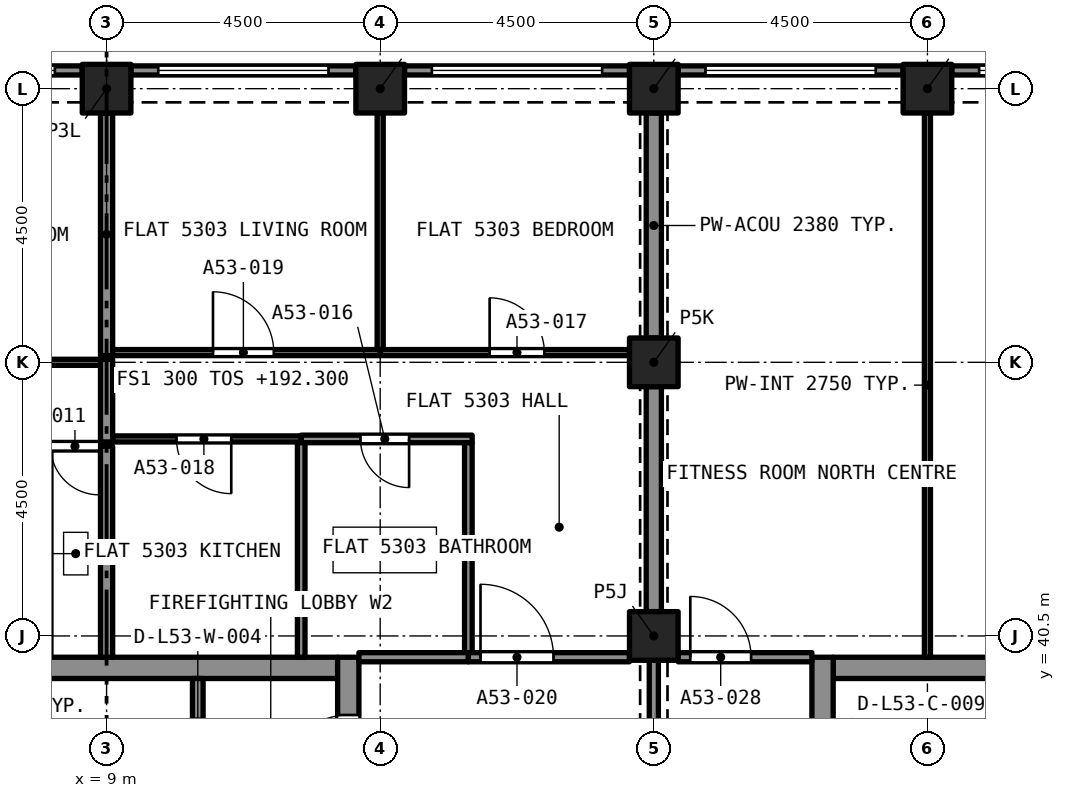
"""IFC4 building model, lengths in metres.
Left out: names, types, materials, properties, quantities, classifications, styles, units other than length and angle.
Written with IfcOpenShell. Run it as: python <this file> out.ifc"""

import sys

from ifc_helpers import new_model, si_unit, direction, frame, frame_2d, origin, origin_2d, place, context, subcontext, project, spatial, rectangle, extrude, element, fill, save


model = new_model("IFC4")
c1 = context("Model", 3, precision=1e-05, world=origin(), true_north=direction((0.0, 1.0)))
c2 = subcontext(c1, "Body", "Model", "MODEL_VIEW")
j1 = project(units=[si_unit("LENGTHUNIT", "METRE"), si_unit("PLANEANGLEUNIT", "RADIAN")], contexts=[c1])
p1 = place(None, origin())
s1 = spatial("IfcSite", under=j1, at=p1, CompositionType="ELEMENT")
p2 = place(p1, origin())
s2 = spatial("IfcBuilding", under=s1, at=p2, CompositionType="ELEMENT")
p3 = place(p2, frame((0.0, 0.0, 192.3)))
s3 = spatial("IfcBuildingStorey", under=s2, at=p3, CompositionType="ELEMENT", Elevation=192.3)
for number, where, z_axis, x_axis in (
    (1, (18.0, 40.5, 0.0), (0.0, 0.0, 1.0), (1.0, 0.0, 0.0)),
    (2, (18.0, 45.0, 0.0), (0.0, 0.0, 1.0), (1.0, 0.0, 0.0)),
    (3, (9.0, 49.5, 0.0), (0.0, 0.0, 1.0), (1.0, 0.0, 0.0)),
    (4, (13.5, 49.5, 0.0), (0.0, 0.0, 1.0), (1.0, 0.0, 0.0)),
    (5, (18.0, 49.5, 0.0), (0.0, 0.0, 1.0), (1.0, 0.0, 0.0)),
    (6, (22.5, 49.5, 0.0), (0.0, 0.0, 1.0), (1.0, 0.0, 0.0)),
):
    element("IfcColumn", number, at=place(p3, frame(where, z_axis=z_axis, x_axis=x_axis)), inside=s3, PredefinedType="COLUMN", context=c2, shape_type="SweptSolid", body=[
        extrude(rectangle(XDim=0.8, YDim=0.8, at=origin_2d()), origin(), (0.0, 0.0, 1.0), 3.2),
    ])
p4 = place(p3, frame((5.2, 39.975, 0.0), z_axis=(0.0, 0.0, 1.0), x_axis=(1.0, 0.0, 0.0)))
e7 = element("IfcWall", 7, at=p4, inside=s3, PredefinedType="SOLIDWALL", context=c2, shape_type="SweptSolid", body=[
    extrude(rectangle(XDim=7.6, YDim=0.35, at=frame_2d((3.8, 0.0))), origin(), (0.0, 0.0, 1.0), 3.2),
])
p5 = place(p3, frame((12.975, 27.35, 0.0), z_axis=(0.0, 0.0, 1.0), x_axis=(0.0, 1.0, 0.0)))
e8 = element("IfcWall", 8, at=p5, inside=s3, PredefinedType="SOLIDWALL", context=c2, shape_type="SweptSolid", body=[
    extrude(rectangle(XDim=12.8, YDim=0.35, at=frame_2d((6.4, 0.0))), origin(), (0.0, 0.0, 1.0), 3.2),
])
p6 = place(p5, frame((10.75, 0.0, 0.0)))
e9 = element("IfcOpeningElement", 9, at=p6, cuts=e8, PredefinedType="OPENING", context=c2, shape_type="SweptSolid", body=[
    extrude(rectangle(XDim=1.1, YDim=2.1, at=frame_2d((0.55, 1.05))), frame((0.0, 0.185, 0.0), z_axis=(0.0, -1.0, 0.0), x_axis=(1.0, 0.0, 0.0)), (0.0, 0.0, 1.0), 0.37),
])
p7 = place(p5, frame((8.6, 0.0, 0.0)))
e10 = element("IfcOpeningElement", 10, at=p7, cuts=e8, PredefinedType="OPENING", context=c2, shape_type="SweptSolid", body=[
    extrude(rectangle(XDim=1.2, YDim=2.1, at=frame_2d((0.6, 1.05))), frame((0.0, 0.185, 0.0), z_axis=(0.0, -1.0, 0.0), x_axis=(1.0, 0.0, 0.0)), (0.0, 0.0, 1.0), 0.37),
])
p8 = place(p3, frame((20.95, 39.975, 0.0), z_axis=(0.0, 0.0, 1.0), x_axis=(1.0, 0.0, 0.0)))
e11 = element("IfcWall", 11, at=p8, inside=s3, PredefinedType="SOLIDWALL", context=c2, shape_type="SweptSolid", body=[
    extrude(rectangle(XDim=7.6, YDim=0.35, at=frame_2d((3.8, 0.0))), origin(), (0.0, 0.0, 1.0), 3.2),
])
p9 = place(p3, frame((20.775, 27.35, 0.0), z_axis=(0.0, 0.0, 1.0), x_axis=(0.0, 1.0, 0.0)))
e12 = element("IfcWall", 12, at=p9, inside=s3, PredefinedType="SOLIDWALL", context=c2, shape_type="SweptSolid", body=[
    extrude(rectangle(XDim=12.8, YDim=0.35, at=frame_2d((6.4, 0.0))), origin(), (0.0, 0.0, 1.0), 3.2),
])
p10 = place(p9, frame((8.6, 0.0, 0.0)))
e13 = element("IfcOpeningElement", 13, at=p10, cuts=e12, PredefinedType="OPENING", context=c2, shape_type="SweptSolid", body=[
    extrude(rectangle(XDim=1.2, YDim=2.1, at=frame_2d((0.6, 1.05))), frame((0.0, 0.185, 0.0), z_axis=(0.0, -1.0, 0.0), x_axis=(1.0, 0.0, 0.0)), (0.0, 0.0, 1.0), 0.37),
])
p11 = place(p3, frame((22.9, 49.8, 0.0), z_axis=(0.0, 0.0, 1.0), x_axis=(1.0, 0.0, 0.0)))
e14 = element("IfcWall", 14, at=p11, inside=s3, PredefinedType="SOLIDWALL", context=c2, shape_type="SweptSolid", body=[
    extrude(rectangle(XDim=3.7, YDim=0.15, at=frame_2d((1.85, 0.0))), origin(), (0.0, 0.0, 1.0), 3.2),
])
p12 = place(p11, frame((0.45, 0.0, 0.45)))
e15 = element("IfcOpeningElement", 15, at=p12, cuts=e14, PredefinedType="OPENING", context=c2, shape_type="SweptSolid", body=[
    extrude(rectangle(XDim=2.8, YDim=1.95, at=frame_2d((1.4, 0.975))), frame((0.0, 0.085, 0.0), z_axis=(0.0, -1.0, 0.0), x_axis=(1.0, 0.0, 0.0)), (0.0, 0.0, 1.0), 0.17),
])
p13 = place(p3, frame((18.4, 49.8, 0.0), z_axis=(0.0, 0.0, 1.0), x_axis=(1.0, 0.0, 0.0)))
e16 = element("IfcWall", 16, at=p13, inside=s3, PredefinedType="SOLIDWALL", context=c2, shape_type="SweptSolid", body=[
    extrude(rectangle(XDim=3.7, YDim=0.15, at=frame_2d((1.85, 0.0))), origin(), (0.0, 0.0, 1.0), 3.2),
])
p14 = place(p13, frame((0.45, 0.0, 0.45)))
e17 = element("IfcOpeningElement", 17, at=p14, cuts=e16, PredefinedType="OPENING", context=c2, shape_type="SweptSolid", body=[
    extrude(rectangle(XDim=2.8, YDim=1.95, at=frame_2d((1.4, 0.975))), frame((0.0, 0.085, 0.0), z_axis=(0.0, -1.0, 0.0), x_axis=(1.0, 0.0, 0.0)), (0.0, 0.0, 1.0), 0.17),
])
p15 = place(p3, frame((13.9, 49.8, 0.0), z_axis=(0.0, 0.0, 1.0), x_axis=(1.0, 0.0, 0.0)))
e18 = element("IfcWall", 18, at=p15, inside=s3, PredefinedType="SOLIDWALL", context=c2, shape_type="SweptSolid", body=[
    extrude(rectangle(XDim=3.7, YDim=0.15, at=frame_2d((1.85, 0.0))), origin(), (0.0, 0.0, 1.0), 3.2),
])
p16 = place(p15, frame((0.45, 0.0, 0.45)))
e19 = element("IfcOpeningElement", 19, at=p16, cuts=e18, PredefinedType="OPENING", context=c2, shape_type="SweptSolid", body=[
    extrude(rectangle(XDim=2.8, YDim=1.95, at=frame_2d((1.4, 0.975))), frame((0.0, 0.085, 0.0), z_axis=(0.0, -1.0, 0.0), x_axis=(1.0, 0.0, 0.0)), (0.0, 0.0, 1.0), 0.17),
])
p17 = place(p3, frame((9.4, 49.8, 0.0), z_axis=(0.0, 0.0, 1.0), x_axis=(1.0, 0.0, 0.0)))
e20 = element("IfcWall", 20, at=p17, inside=s3, PredefinedType="SOLIDWALL", context=c2, shape_type="SweptSolid", body=[
    extrude(rectangle(XDim=3.7, YDim=0.15, at=frame_2d((1.85, 0.0))), origin(), (0.0, 0.0, 1.0), 3.2),
])
p18 = place(p17, frame((0.45, 0.0, 0.45)))
e21 = element("IfcOpeningElement", 21, at=p18, cuts=e20, PredefinedType="OPENING", context=c2, shape_type="SweptSolid", body=[
    extrude(rectangle(XDim=2.8, YDim=1.95, at=frame_2d((1.4, 0.975))), frame((0.0, 0.085, 0.0), z_axis=(0.0, -1.0, 0.0), x_axis=(1.0, 0.0, 0.0)), (0.0, 0.0, 1.0), 0.17),
])
p19 = place(p3, frame((4.9, 49.8, 0.0), z_axis=(0.0, 0.0, 1.0), x_axis=(1.0, 0.0, 0.0)))
e22 = element("IfcWall", 22, at=p19, inside=s3, PredefinedType="SOLIDWALL", context=c2, shape_type="SweptSolid", body=[
    extrude(rectangle(XDim=3.7, YDim=0.15, at=frame_2d((1.85, 0.0))), origin(), (0.0, 0.0, 1.0), 3.2),
])
p20 = place(p19, frame((0.45, 0.0, 0.45)))
e23 = element("IfcOpeningElement", 23, at=p20, cuts=e22, PredefinedType="OPENING", context=c2, shape_type="SweptSolid", body=[
    extrude(rectangle(XDim=2.8, YDim=1.95, at=frame_2d((1.4, 0.975))), frame((0.0, 0.085, 0.0), z_axis=(0.0, -1.0, 0.0), x_axis=(1.0, 0.0, 0.0)), (0.0, 0.0, 1.0), 0.17),
])
p21 = place(p3, frame((9.0, 43.62, 0.0), z_axis=(0.0, 0.0, 1.0), x_axis=(-1.0, 0.0, 0.0)))
e24 = element("IfcWall", 24, at=p21, inside=s3, PredefinedType="PARTITIONING", context=c2, shape_type="SweptSolid", body=[
    extrude(rectangle(XDim=0.977, YDim=0.125, at=frame_2d((0.489, 0.0))), origin(), (0.0, 0.0, 1.0), 2.9),
])
p22 = place(p21, frame((0.12, 0.0, 0.0)))
e25 = element("IfcOpeningElement", 25, at=p22, cuts=e24, PredefinedType="OPENING", context=c2, shape_type="SweptSolid", body=[
    extrude(rectangle(XDim=0.8, YDim=2.1, at=frame_2d((0.4, 1.05))), frame((0.0, 0.073, 0.0), z_axis=(0.0, -1.0, 0.0), x_axis=(1.0, 0.0, 0.0)), (0.0, 0.0, 1.0), 0.145),
])
p23 = place(p3, frame((9.0, 40.15, 0.0), z_axis=(0.0, 0.0, 1.0), x_axis=(0.0, 1.0, 0.0)))
e26 = element("IfcWall", 26, at=p23, inside=s3, PredefinedType="PARTITIONING", context=c2, shape_type="SweptSolid", body=[
    extrude(rectangle(XDim=3.47, YDim=0.2, at=frame_2d((1.735, 0.0))), origin(), (0.0, 0.0, 1.0), 2.9),
])
p24 = place(p3, frame((4.5, 45.0, 0.0), z_axis=(0.0, 0.0, 1.0), x_axis=(1.0, 0.0, 0.0)))
e27 = element("IfcWall", 27, at=p24, inside=s3, PredefinedType="PARTITIONING", context=c2, shape_type="SweptSolid", body=[
    extrude(rectangle(XDim=4.4, YDim=0.1, at=frame_2d((2.2, 0.0))), origin(), (0.0, 0.0, 1.0), 2.9),
])
p25 = place(p24, frame((1.8, 0.0, 0.0)))
e28 = element("IfcOpeningElement", 28, at=p25, cuts=e27, PredefinedType="OPENING", context=c2, shape_type="SweptSolid", body=[
    extrude(rectangle(XDim=0.9, YDim=2.1, at=frame_2d((0.45, 1.05))), frame((0.0, 0.06, 0.0), z_axis=(0.0, -1.0, 0.0), x_axis=(1.0, 0.0, 0.0)), (0.0, 0.0, 1.0), 0.12),
])
p26 = place(p3, frame((9.0, 45.11, 0.0), z_axis=(0.0, 0.0, 1.0), x_axis=(0.0, 1.0, 0.0)))
e29 = element("IfcWall", 29, at=p26, inside=s3, PredefinedType="PARTITIONING", context=c2, shape_type="SweptSolid", body=[
    extrude(rectangle(XDim=3.99, YDim=0.2, at=frame_2d((1.995, 0.0))), origin(), (0.0, 0.0, 1.0), 2.9),
])
p27 = place(p3, frame((9.0, 43.69, 0.0), z_axis=(0.0, 0.0, 1.0), x_axis=(0.0, 1.0, 0.0)))
e30 = element("IfcWall", 30, at=p27, inside=s3, PredefinedType="PARTITIONING", context=c2, shape_type="SweptSolid", body=[
    extrude(rectangle(XDim=1.36, YDim=0.2, at=frame_2d((0.68, 0.0))), origin(), (0.0, 0.0, 1.0), 2.9),
])
p28 = place(p3, frame((15.012, 43.74, 0.0), z_axis=(0.0, 0.0, 1.0), x_axis=(-1.0, 0.0, 0.0)))
e31 = element("IfcWall", 31, at=p28, inside=s3, PredefinedType="PARTITIONING", context=c2, shape_type="SweptSolid", body=[
    extrude(rectangle(XDim=2.812, YDim=0.125, at=frame_2d((1.406, 0.0))), origin(), (0.0, 0.0, 1.0), 2.9),
])
p29 = place(p28, frame((1.037, 0.0, 0.0)))
e32 = element("IfcOpeningElement", 32, at=p29, cuts=e31, PredefinedType="OPENING", context=c2, shape_type="SweptSolid", body=[
    extrude(rectangle(XDim=0.8, YDim=2.1, at=frame_2d((0.4, 1.05))), frame((0.0, 0.073, 0.0), z_axis=(0.0, -1.0, 0.0), x_axis=(1.0, 0.0, 0.0)), (0.0, 0.0, 1.0), 0.145),
])
p30 = place(p3, frame((14.95, 40.225, 0.0), z_axis=(0.0, 0.0, 1.0), x_axis=(0.0, 1.0, 0.0)))
e33 = element("IfcWall", 33, at=p30, inside=s3, PredefinedType="PARTITIONING", context=c2, shape_type="SweptSolid", body=[
    extrude(rectangle(XDim=3.452, YDim=0.125, at=frame_2d((1.726, 0.0))), origin(), (0.0, 0.0, 1.0), 2.9),
])
p31 = place(p3, frame((12.201, 40.15, 0.0), z_axis=(0.0, 0.0, 1.0), x_axis=(0.0, 1.0, 0.0)))
e34 = element("IfcWall", 34, at=p31, inside=s3, PredefinedType="PARTITIONING", context=c2, shape_type="SweptSolid", body=[
    extrude(rectangle(XDim=3.528, YDim=0.125, at=frame_2d((1.764, 0.0))), origin(), (0.0, 0.0, 1.0), 2.9),
])
p32 = place(p3, frame((13.15, 40.15, 0.0), z_axis=(0.0, 0.0, 1.0), x_axis=(1.0, 0.0, 0.0)))
e35 = element("IfcWall", 35, at=p32, inside=s3, PredefinedType="PARTITIONING", context=c2, shape_type="SweptSolid", body=[
    extrude(rectangle(XDim=1.8, YDim=0.15, at=frame_2d((0.9, 0.0))), origin(), (0.0, 0.0, 1.0), 2.9),
])
p33 = place(p3, frame((13.5, 45.16, 0.0), z_axis=(0.0, 0.0, 1.0), x_axis=(1.0, 0.0, 0.0)))
e36 = element("IfcWall", 36, at=p33, inside=s3, PredefinedType="PARTITIONING", context=c2, shape_type="SweptSolid", body=[
    extrude(rectangle(XDim=4.1, YDim=0.1, at=frame_2d((2.05, 0.0))), origin(), (0.0, 0.0, 1.0), 2.9),
])
p34 = place(p33, frame((1.8, 0.0, 0.0)))
e37 = element("IfcOpeningElement", 37, at=p34, cuts=e36, PredefinedType="OPENING", context=c2, shape_type="SweptSolid", body=[
    extrude(rectangle(XDim=0.9, YDim=2.1, at=frame_2d((0.45, 1.05))), frame((0.0, 0.06, 0.0), z_axis=(0.0, -1.0, 0.0), x_axis=(1.0, 0.0, 0.0)), (0.0, 0.0, 1.0), 0.12),
])
p35 = place(p3, frame((13.5, 45.21, 0.0), z_axis=(0.0, 0.0, 1.0), x_axis=(0.0, 1.0, 0.0)))
e38 = element("IfcWall", 38, at=p35, inside=s3, PredefinedType="PARTITIONING", context=c2, shape_type="SweptSolid", body=[
    extrude(rectangle(XDim=3.89, YDim=0.1, at=frame_2d((1.945, 0.0))), origin(), (0.0, 0.0, 1.0), 2.9),
])
p36 = place(p3, frame((18.0, 45.4, 0.0), z_axis=(0.0, 0.0, 1.0), x_axis=(0.0, 1.0, 0.0)))
e39 = element("IfcWall", 39, at=p36, inside=s3, PredefinedType="PARTITIONING", context=c2, shape_type="SweptSolid", body=[
    extrude(rectangle(XDim=3.7, YDim=0.25, at=frame_2d((1.85, 0.0))), origin(), (0.0, 0.0, 1.0), 2.38),
])
p37 = place(p3, frame((12.201, 43.74, 0.0), z_axis=(0.0, 0.0, 1.0), x_axis=(-1.0, 0.0, 0.0)))
e40 = element("IfcWall", 40, at=p37, inside=s3, PredefinedType="PARTITIONING", context=c2, shape_type="SweptSolid", body=[
    extrude(rectangle(XDim=3.101, YDim=0.1, at=frame_2d((1.55, 0.0))), origin(), (0.0, 0.0, 1.0), 2.9),
])
p38 = place(p37, frame((1.15, 0.0, 0.0)))
e41 = element("IfcOpeningElement", 41, at=p38, cuts=e40, PredefinedType="OPENING", context=c2, shape_type="SweptSolid", body=[
    extrude(rectangle(XDim=0.9, YDim=2.1, at=frame_2d((0.45, 1.05))), frame((0.0, 0.06, 0.0), z_axis=(0.0, -1.0, 0.0), x_axis=(1.0, 0.0, 0.0)), (0.0, 0.0, 1.0), 0.12),
])
p39 = place(p3, frame((9.1, 45.16, 0.0), z_axis=(0.0, 0.0, 1.0), x_axis=(1.0, 0.0, 0.0)))
e42 = element("IfcWall", 42, at=p39, inside=s3, PredefinedType="PARTITIONING", context=c2, shape_type="SweptSolid", body=[
    extrude(rectangle(XDim=4.4, YDim=0.1, at=frame_2d((2.2, 0.0))), origin(), (0.0, 0.0, 1.0), 2.9),
])
p40 = place(p39, frame((1.65, 0.0, 0.0)))
e43 = element("IfcOpeningElement", 43, at=p40, cuts=e42, PredefinedType="OPENING", context=c2, shape_type="SweptSolid", body=[
    extrude(rectangle(XDim=1.0, YDim=2.1, at=frame_2d((0.5, 1.05))), frame((0.0, 0.06, 0.0), z_axis=(0.0, -1.0, 0.0), x_axis=(1.0, 0.0, 0.0)), (0.0, 0.0, 1.0), 0.12),
])
p41 = place(p3, frame((18.0, 40.9, 0.0), z_axis=(0.0, 0.0, 1.0), x_axis=(0.0, 1.0, 0.0)))
e44 = element("IfcWall", 44, at=p41, inside=s3, PredefinedType="PARTITIONING", context=c2, shape_type="SweptSolid", body=[
    extrude(rectangle(XDim=3.7, YDim=0.25, at=frame_2d((1.85, 0.0))), origin(), (0.0, 0.0, 1.0), 2.38),
])
p42 = place(p3, frame((14.95, 40.15, 0.0), z_axis=(0.0, 0.0, 1.0), x_axis=(1.0, 0.0, 0.0)))
e45 = element("IfcWall", 45, at=p42, inside=s3, PredefinedType="PARTITIONING", context=c2, shape_type="SweptSolid", body=[
    extrude(rectangle(XDim=2.65, YDim=0.15, at=frame_2d((1.325, 0.0))), origin(), (0.0, 0.0, 1.0), 2.9),
])
p43 = place(p42, frame((0.2, 0.0, 0.0)))
e46 = element("IfcOpeningElement", 46, at=p43, cuts=e45, PredefinedType="OPENING", context=c2, shape_type="SweptSolid", body=[
    extrude(rectangle(XDim=1.2, YDim=2.4, at=frame_2d((0.6, 1.2))), frame((0.0, 0.085, 0.0), z_axis=(0.0, -1.0, 0.0), x_axis=(1.0, 0.0, 0.0)), (0.0, 0.0, 1.0), 0.17),
])
p44 = place(p3, frame((18.4, 40.15, 0.0), z_axis=(0.0, 0.0, 1.0), x_axis=(1.0, 0.0, 0.0)))
e47 = element("IfcWall", 47, at=p44, inside=s3, PredefinedType="PARTITIONING", context=c2, shape_type="SweptSolid", body=[
    extrude(rectangle(XDim=2.2, YDim=0.15, at=frame_2d((1.1, 0.0))), origin(), (0.0, 0.0, 1.0), 2.75),
])
p45 = place(p44, frame((0.2, 0.0, 0.0)))
e48 = element("IfcOpeningElement", 48, at=p45, cuts=e47, PredefinedType="OPENING", context=c2, shape_type="SweptSolid", body=[
    extrude(rectangle(XDim=1.0, YDim=2.1, at=frame_2d((0.5, 1.05))), frame((0.0, 0.085, 0.0), z_axis=(0.0, -1.0, 0.0), x_axis=(1.0, 0.0, 0.0)), (0.0, 0.0, 1.0), 0.17),
])
p46 = place(p3, frame((18.0, 40.1, 0.0), z_axis=(0.0, 0.0, 1.0), x_axis=(0.0, -1.0, 0.0)))
e49 = element("IfcWall", 49, at=p46, inside=s3, PredefinedType="PARTITIONING", context=c2, shape_type="SweptSolid", body=[
    extrude(rectangle(XDim=3.7, YDim=0.15, at=frame_2d((1.85, 0.0))), origin(), (0.0, 0.0, 1.0), 2.38),
])
p47 = place(p46, frame((1.25, 0.0, 0.0)))
e50 = element("IfcOpeningElement", 50, at=p47, cuts=e49, PredefinedType="OPENING", context=c2, shape_type="SweptSolid", body=[
    extrude(rectangle(XDim=1.2, YDim=2.1, at=frame_2d((0.6, 1.05))), frame((0.0, 0.085, 0.0), z_axis=(0.0, -1.0, 0.0), x_axis=(1.0, 0.0, 0.0)), (0.0, 0.0, 1.0), 0.17),
])
p48 = place(p3, frame((22.5, 40.15, 0.0), z_axis=(0.0, 0.0, 1.0), x_axis=(0.0, 1.0, 0.0)))
e51 = element("IfcWall", 51, at=p48, inside=s3, PredefinedType="PARTITIONING", context=c2, shape_type="SweptSolid", body=[
    extrude(rectangle(XDim=8.95, YDim=0.1, at=frame_2d((4.475, 0.0))), origin(), (0.0, 0.0, 1.0), 2.75),
])
p49 = place(p3, frame((10.5, 37.5, 0.0), z_axis=(0.0, 0.0, 1.0), x_axis=(0.0, 1.0, 0.0)))
e52 = element("IfcWall", 52, at=p49, inside=s3, PredefinedType="SOLIDWALL", context=c2, shape_type="SweptSolid", body=[
    extrude(rectangle(XDim=2.3, YDim=0.175, at=frame_2d((1.15, 0.0))), origin(), (0.0, 0.0, 1.0), 2.9),
])
p50 = place(p49, frame((0.65, 0.0, 0.0)))
e53 = element("IfcOpeningElement", 53, at=p50, cuts=e52, PredefinedType="OPENING", context=c2, shape_type="SweptSolid", body=[
    extrude(rectangle(XDim=1.0, YDim=2.1, at=frame_2d((0.5, 1.05))), frame((0.0, 0.097, 0.0), z_axis=(0.0, -1.0, 0.0), x_axis=(1.0, 0.0, 0.0)), (0.0, 0.0, 1.0), 0.195),
])
p51 = place(p12, origin())
e54 = element("IfcWindow", 54, at=p51, inside=s3, PartitioningType="SINGLE_PANEL", PredefinedType="WINDOW", context=c2, shape_type="SweptSolid", body=[
    extrude(rectangle(XDim=2.8, YDim=1.95, at=frame_2d((1.4, 0.975))), frame((0.0, 0.03, 0.0), z_axis=(0.0, -1.0, 0.0), x_axis=(1.0, 0.0, 0.0)), (0.0, 0.0, 1.0), 0.06),
])
fill(e15, e54)
p52 = place(p14, origin())
e55 = element("IfcWindow", 55, at=p52, inside=s3, PartitioningType="SINGLE_PANEL", PredefinedType="WINDOW", context=c2, shape_type="SweptSolid", body=[
    extrude(rectangle(XDim=2.8, YDim=1.95, at=frame_2d((1.4, 0.975))), frame((0.0, 0.03, 0.0), z_axis=(0.0, -1.0, 0.0), x_axis=(1.0, 0.0, 0.0)), (0.0, 0.0, 1.0), 0.06),
])
fill(e17, e55)
p53 = place(p16, origin())
e56 = element("IfcWindow", 56, at=p53, inside=s3, PartitioningType="SINGLE_PANEL", PredefinedType="WINDOW", context=c2, shape_type="SweptSolid", body=[
    extrude(rectangle(XDim=2.8, YDim=1.95, at=frame_2d((1.4, 0.975))), frame((0.0, 0.03, 0.0), z_axis=(0.0, -1.0, 0.0), x_axis=(1.0, 0.0, 0.0)), (0.0, 0.0, 1.0), 0.06),
])
fill(e19, e56)
p54 = place(p18, origin())
e57 = element("IfcWindow", 57, at=p54, inside=s3, PartitioningType="SINGLE_PANEL", PredefinedType="WINDOW", context=c2, shape_type="SweptSolid", body=[
    extrude(rectangle(XDim=2.8, YDim=1.95, at=frame_2d((1.4, 0.975))), frame((0.0, 0.03, 0.0), z_axis=(0.0, -1.0, 0.0), x_axis=(1.0, 0.0, 0.0)), (0.0, 0.0, 1.0), 0.06),
])
fill(e21, e57)
p55 = place(p20, origin())
e58 = element("IfcWindow", 58, at=p55, inside=s3, PartitioningType="SINGLE_PANEL", PredefinedType="WINDOW", context=c2, shape_type="SweptSolid", body=[
    extrude(rectangle(XDim=2.8, YDim=1.95, at=frame_2d((1.4, 0.975))), frame((0.0, 0.03, 0.0), z_axis=(0.0, -1.0, 0.0), x_axis=(1.0, 0.0, 0.0)), (0.0, 0.0, 1.0), 0.06),
])
fill(e23, e58)
p56 = place(p22, origin())
e59 = element("IfcDoor", 59, at=p56, inside=s3, OperationType="SINGLE_SWING_LEFT", PredefinedType="DOOR", context=c2, shape_type="SweptSolid", body=[
    extrude(rectangle(XDim=0.8, YDim=2.1, at=frame_2d((0.4, 1.05))), frame((0.0, 0.025, 0.0), z_axis=(0.0, -1.0, 0.0), x_axis=(1.0, 0.0, 0.0)), (0.0, 0.0, 1.0), 0.05),
])
fill(e25, e59)
p57 = place(p29, origin())
e60 = element("IfcDoor", 60, at=p57, inside=s3, OperationType="SINGLE_SWING_RIGHT", PredefinedType="DOOR", context=c2, shape_type="SweptSolid", body=[
    extrude(rectangle(XDim=0.8, YDim=2.1, at=frame_2d((0.4, 1.05))), frame((0.0, 0.025, 0.0), z_axis=(0.0, -1.0, 0.0), x_axis=(1.0, 0.0, 0.0)), (0.0, 0.0, 1.0), 0.05),
])
fill(e32, e60)
p58 = place(p34, origin())
e61 = element("IfcDoor", 61, at=p58, inside=s3, OperationType="SINGLE_SWING_RIGHT", PredefinedType="DOOR", context=c2, shape_type="SweptSolid", body=[
    extrude(rectangle(XDim=0.9, YDim=2.1, at=frame_2d((0.45, 1.05))), frame((0.0, 0.025, 0.0), z_axis=(0.0, -1.0, 0.0), x_axis=(1.0, 0.0, 0.0)), (0.0, 0.0, 1.0), 0.05),
])
fill(e37, e61)
p59 = place(p38, origin())
e62 = element("IfcDoor", 62, at=p59, inside=s3, OperationType="SINGLE_SWING_RIGHT", PredefinedType="DOOR", context=c2, shape_type="SweptSolid", body=[
    extrude(rectangle(XDim=0.9, YDim=2.1, at=frame_2d((0.45, 1.05))), frame((0.0, 0.025, 0.0), z_axis=(0.0, -1.0, 0.0), x_axis=(1.0, 0.0, 0.0)), (0.0, 0.0, 1.0), 0.05),
])
fill(e41, e62)
p60 = place(p40, origin())
e63 = element("IfcDoor", 63, at=p60, inside=s3, OperationType="SINGLE_SWING_LEFT", PredefinedType="DOOR", context=c2, shape_type="SweptSolid", body=[
    extrude(rectangle(XDim=1.0, YDim=2.1, at=frame_2d((0.5, 1.05))), frame((0.0, 0.025, 0.0), z_axis=(0.0, -1.0, 0.0), x_axis=(1.0, 0.0, 0.0)), (0.0, 0.0, 1.0), 0.05),
])
fill(e43, e63)
p61 = place(p43, origin())
e64 = element("IfcDoor", 64, at=p61, inside=s3, OperationType="SINGLE_SWING_LEFT", PredefinedType="DOOR", context=c2, shape_type="SweptSolid", body=[
    extrude(rectangle(XDim=1.2, YDim=2.4, at=frame_2d((0.6, 1.2))), frame((0.0, 0.025, 0.0), z_axis=(0.0, -1.0, 0.0), x_axis=(1.0, 0.0, 0.0)), (0.0, 0.0, 1.0), 0.05),
])
fill(e46, e64)
p62 = place(p45, origin())
e65 = element("IfcDoor", 65, at=p62, inside=s3, OperationType="SINGLE_SWING_LEFT", PredefinedType="DOOR", context=c2, shape_type="SweptSolid", body=[
    extrude(rectangle(XDim=1.0, YDim=2.1, at=frame_2d((0.5, 1.05))), frame((0.0, 0.025, 0.0), z_axis=(0.0, -1.0, 0.0), x_axis=(1.0, 0.0, 0.0)), (0.0, 0.0, 1.0), 0.05),
])
fill(e48, e65)
p63 = place(p6, origin())
e66 = element("IfcDoor", 66, at=p63, inside=s3, OperationType="SINGLE_SWING_LEFT", PredefinedType="DOOR", context=c2, shape_type="SweptSolid", body=[
    extrude(rectangle(XDim=1.1, YDim=2.1, at=frame_2d((0.55, 1.05))), frame((0.0, 0.025, 0.0), z_axis=(0.0, -1.0, 0.0), x_axis=(1.0, 0.0, 0.0)), (0.0, 0.0, 1.0), 0.05),
])
fill(e9, e66)
save(model, sys.argv[1])
